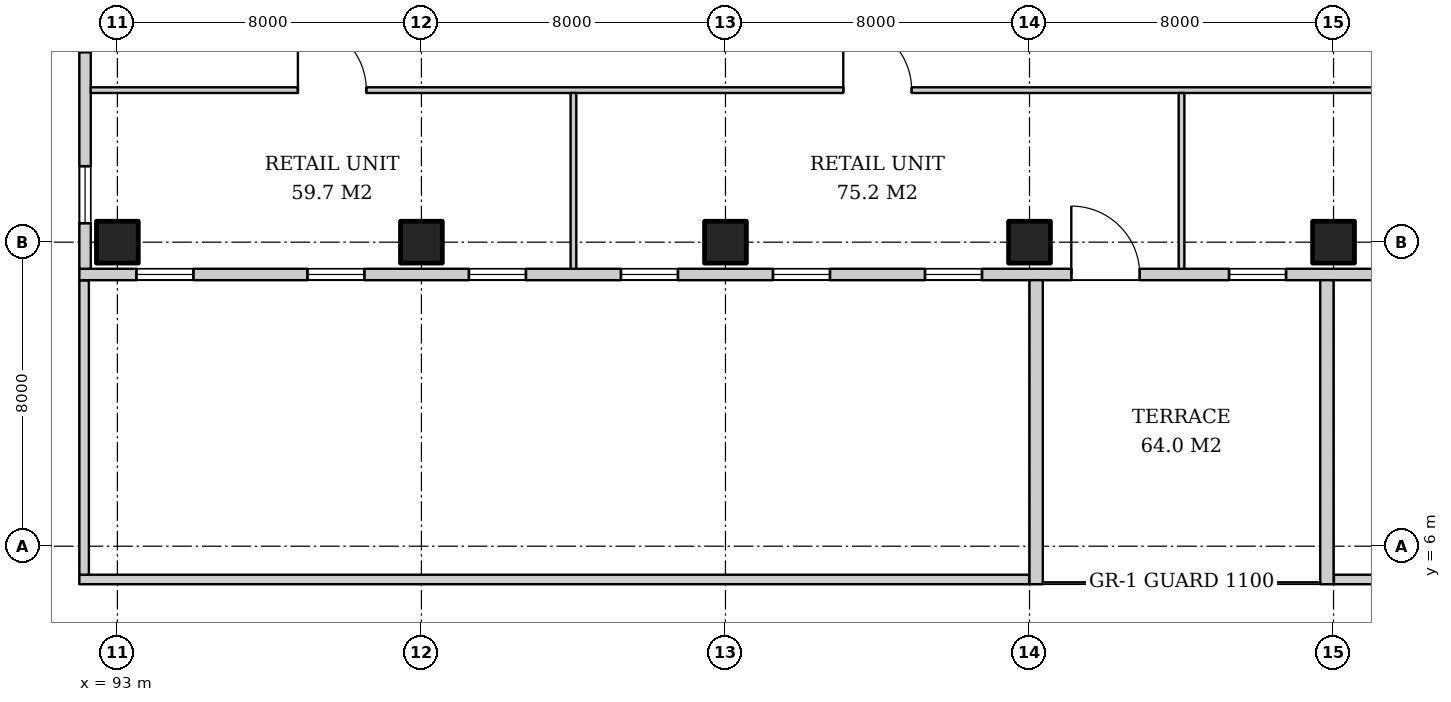
"""IFC4 building model, lengths in metres.
Left out: names, types, materials, properties, quantities, classifications, styles, units other than length and angle.
Written with IfcOpenShell. Run it as: python <this file> out.ifc"""

import sys

from ifc_helpers import new_model, si_unit, direction, frame, frame_2d, origin, origin_2d, place, context, subcontext, project, spatial, rectangle, extrude, element, fill, save


model = new_model("IFC4")
c1 = context("Model", 3, precision=1e-05, world=origin(), true_north=direction((0.0, 1.0)))
c2 = subcontext(c1, "Body", "Model", "MODEL_VIEW")
j1 = project(units=[si_unit("LENGTHUNIT", "METRE"), si_unit("PLANEANGLEUNIT", "RADIAN")], contexts=[c1])
p1 = place(None, origin())
s1 = spatial("IfcSite", under=j1, at=p1, CompositionType="ELEMENT")
p2 = place(p1, origin())
s2 = spatial("IfcBuilding", under=s1, at=p2, CompositionType="ELEMENT")
p3 = place(p2, frame((0.0, 0.0, 6.0)))
s3 = spatial("IfcBuildingStorey", under=s2, at=p3, CompositionType="ELEMENT", Elevation=6.0)
for number, where, z_axis, x_axis in (
    (1, (93.0, 14.0, 0.0), (0.0, 0.0, 1.0), (1.0, 0.0, 0.0)),
    (2, (101.0, 14.0, 0.0), (0.0, 0.0, 1.0), (1.0, 0.0, 0.0)),
    (3, (109.0, 14.0, 0.0), (0.0, 0.0, 1.0), (1.0, 0.0, 0.0)),
    (4, (117.0, 14.0, 0.0), (0.0, 0.0, 1.0), (1.0, 0.0, 0.0)),
    (5, (125.0, 14.0, 0.0), (0.0, 0.0, 1.0), (1.0, 0.0, 0.0)),
):
    element("IfcColumn", number, at=place(p3, frame(where, z_axis=z_axis, x_axis=x_axis)), inside=s3, PredefinedType="COLUMN", context=c2, shape_type="SweptSolid", body=[
        extrude(rectangle(XDim=1.1, YDim=1.1, at=origin_2d()), origin(), (0.0, 0.0, 1.0), 5.0),
    ])
p4 = place(p3, frame((92.0, 13.15, 0.0), z_axis=(0.0, 0.0, 1.0), x_axis=(1.0, 0.0, 0.0)))
e6 = element("IfcWall", 6, at=p4, inside=s3, PredefinedType="SOLIDWALL", context=c2, shape_type="SweptSolid", body=[
    extrude(rectangle(XDim=50.0, YDim=0.3, at=frame_2d((25.0, 0.0))), origin(), (0.0, 0.0, 1.0), 4.7),
])
p5 = place(p4, frame((1.5, 0.0, 0.9)))
e7 = element("IfcOpeningElement", 7, at=p5, cuts=e6, PredefinedType="OPENING", context=c2, shape_type="SweptSolid", body=[
    extrude(rectangle(XDim=1.5, YDim=3.2, at=frame_2d((0.75, 1.6))), frame((0.0, 0.16, 0.0), z_axis=(0.0, -1.0, 0.0), x_axis=(1.0, 0.0, 0.0)), (0.0, 0.0, 1.0), 0.32),
])
p6 = place(p4, frame((6.0, 0.0, 0.9)))
e8 = element("IfcOpeningElement", 8, at=p6, cuts=e6, PredefinedType="OPENING", context=c2, shape_type="SweptSolid", body=[
    extrude(rectangle(XDim=1.5, YDim=3.2, at=frame_2d((0.75, 1.6))), frame((0.0, 0.16, 0.0), z_axis=(0.0, -1.0, 0.0), x_axis=(1.0, 0.0, 0.0)), (0.0, 0.0, 1.0), 0.32),
])
p7 = place(p4, frame((10.25, 0.0, 0.9)))
e9 = element("IfcOpeningElement", 9, at=p7, cuts=e6, PredefinedType="OPENING", context=c2, shape_type="SweptSolid", body=[
    extrude(rectangle(XDim=1.5, YDim=3.2, at=frame_2d((0.75, 1.6))), frame((0.0, 0.16, 0.0), z_axis=(0.0, -1.0, 0.0), x_axis=(1.0, 0.0, 0.0)), (0.0, 0.0, 1.0), 0.32),
])
p8 = place(p4, frame((14.25, 0.0, 0.9)))
e10 = element("IfcOpeningElement", 10, at=p8, cuts=e6, PredefinedType="OPENING", context=c2, shape_type="SweptSolid", body=[
    extrude(rectangle(XDim=1.5, YDim=3.2, at=frame_2d((0.75, 1.6))), frame((0.0, 0.16, 0.0), z_axis=(0.0, -1.0, 0.0), x_axis=(1.0, 0.0, 0.0)), (0.0, 0.0, 1.0), 0.32),
])
p9 = place(p4, frame((18.25, 0.0, 0.9)))
e11 = element("IfcOpeningElement", 11, at=p9, cuts=e6, PredefinedType="OPENING", context=c2, shape_type="SweptSolid", body=[
    extrude(rectangle(XDim=1.5, YDim=3.2, at=frame_2d((0.75, 1.6))), frame((0.0, 0.16, 0.0), z_axis=(0.0, -1.0, 0.0), x_axis=(1.0, 0.0, 0.0)), (0.0, 0.0, 1.0), 0.32),
])
p10 = place(p4, frame((22.25, 0.0, 0.9)))
e12 = element("IfcOpeningElement", 12, at=p10, cuts=e6, PredefinedType="OPENING", context=c2, shape_type="SweptSolid", body=[
    extrude(rectangle(XDim=1.5, YDim=3.2, at=frame_2d((0.75, 1.6))), frame((0.0, 0.16, 0.0), z_axis=(0.0, -1.0, 0.0), x_axis=(1.0, 0.0, 0.0)), (0.0, 0.0, 1.0), 0.32),
])
p11 = place(p4, frame((26.1, 0.0, 0.0)))
e13 = element("IfcOpeningElement", 13, at=p11, cuts=e6, PredefinedType="OPENING", context=c2, shape_type="SweptSolid", body=[
    extrude(rectangle(XDim=1.8, YDim=2.4, at=frame_2d((0.9, 1.2))), frame((0.0, 0.16, 0.0), z_axis=(0.0, -1.0, 0.0), x_axis=(1.0, 0.0, 0.0)), (0.0, 0.0, 1.0), 0.32),
])
p12 = place(p4, frame((30.25, 0.0, 0.9)))
e14 = element("IfcOpeningElement", 14, at=p12, cuts=e6, PredefinedType="OPENING", context=c2, shape_type="SweptSolid", body=[
    extrude(rectangle(XDim=1.5, YDim=3.2, at=frame_2d((0.75, 1.6))), frame((0.0, 0.16, 0.0), z_axis=(0.0, -1.0, 0.0), x_axis=(1.0, 0.0, 0.0)), (0.0, 0.0, 1.0), 0.32),
])
p13 = place(p4, frame((34.25, 0.0, 0.9)))
e15 = element("IfcOpeningElement", 15, at=p13, cuts=e6, PredefinedType="OPENING", context=c2, shape_type="SweptSolid", body=[
    extrude(rectangle(XDim=1.5, YDim=3.2, at=frame_2d((0.75, 1.6))), frame((0.0, 0.16, 0.0), z_axis=(0.0, -1.0, 0.0), x_axis=(1.0, 0.0, 0.0)), (0.0, 0.0, 1.0), 0.32),
])
p14 = place(p4, frame((38.25, 0.0, 0.9)))
e16 = element("IfcOpeningElement", 16, at=p14, cuts=e6, PredefinedType="OPENING", context=c2, shape_type="SweptSolid", body=[
    extrude(rectangle(XDim=1.5, YDim=3.2, at=frame_2d((0.75, 1.6))), frame((0.0, 0.16, 0.0), z_axis=(0.0, -1.0, 0.0), x_axis=(1.0, 0.0, 0.0)), (0.0, 0.0, 1.0), 0.32),
])
p15 = place(p4, frame((42.5, 0.0, 0.9)))
e17 = element("IfcOpeningElement", 17, at=p15, cuts=e6, PredefinedType="OPENING", context=c2, shape_type="SweptSolid", body=[
    extrude(rectangle(XDim=1.5, YDim=3.2, at=frame_2d((0.75, 1.6))), frame((0.0, 0.16, 0.0), z_axis=(0.0, -1.0, 0.0), x_axis=(1.0, 0.0, 0.0)), (0.0, 0.0, 1.0), 0.32),
])
p16 = place(p4, frame((47.0, 0.0, 0.9)))
e18 = element("IfcOpeningElement", 18, at=p16, cuts=e6, PredefinedType="OPENING", context=c2, shape_type="SweptSolid", body=[
    extrude(rectangle(XDim=1.5, YDim=3.2, at=frame_2d((0.75, 1.6))), frame((0.0, 0.16, 0.0), z_axis=(0.0, -1.0, 0.0), x_axis=(1.0, 0.0, 0.0)), (0.0, 0.0, 1.0), 0.32),
])
p17 = place(p3, frame((92.15, 41.5, 0.0), z_axis=(0.0, 0.0, 1.0), x_axis=(0.0, -1.0, 0.0)))
e19 = element("IfcWall", 19, at=p17, inside=s3, PredefinedType="SOLIDWALL", context=c2, shape_type="SweptSolid", body=[
    extrude(rectangle(XDim=28.2, YDim=0.3, at=frame_2d((14.1, 0.0))), origin(), (0.0, 0.0, 1.0), 4.7),
])
p18 = place(p17, frame((0.75, 0.0, 0.9)))
e20 = element("IfcOpeningElement", 20, at=p18, cuts=e19, PredefinedType="OPENING", context=c2, shape_type="SweptSolid", body=[
    extrude(rectangle(XDim=1.5, YDim=3.2, at=frame_2d((0.75, 1.6))), frame((0.0, 0.16, 0.0), z_axis=(0.0, -1.0, 0.0), x_axis=(1.0, 0.0, 0.0)), (0.0, 0.0, 1.0), 0.32),
])
p19 = place(p17, frame((4.75, 0.0, 0.9)))
e21 = element("IfcOpeningElement", 21, at=p19, cuts=e19, PredefinedType="OPENING", context=c2, shape_type="SweptSolid", body=[
    extrude(rectangle(XDim=1.5, YDim=3.2, at=frame_2d((0.75, 1.6))), frame((0.0, 0.16, 0.0), z_axis=(0.0, -1.0, 0.0), x_axis=(1.0, 0.0, 0.0)), (0.0, 0.0, 1.0), 0.32),
])
p20 = place(p17, frame((8.75, 0.0, 0.9)))
e22 = element("IfcOpeningElement", 22, at=p20, cuts=e19, PredefinedType="OPENING", context=c2, shape_type="SweptSolid", body=[
    extrude(rectangle(XDim=1.5, YDim=3.2, at=frame_2d((0.75, 1.6))), frame((0.0, 0.16, 0.0), z_axis=(0.0, -1.0, 0.0), x_axis=(1.0, 0.0, 0.0)), (0.0, 0.0, 1.0), 0.32),
])
p21 = place(p17, frame((12.75, 0.0, 0.9)))
e23 = element("IfcOpeningElement", 23, at=p21, cuts=e19, PredefinedType="OPENING", context=c2, shape_type="SweptSolid", body=[
    extrude(rectangle(XDim=1.5, YDim=3.2, at=frame_2d((0.75, 1.6))), frame((0.0, 0.16, 0.0), z_axis=(0.0, -1.0, 0.0), x_axis=(1.0, 0.0, 0.0)), (0.0, 0.0, 1.0), 0.32),
])
p22 = place(p17, frame((16.75, 0.0, 0.9)))
e24 = element("IfcOpeningElement", 24, at=p22, cuts=e19, PredefinedType="OPENING", context=c2, shape_type="SweptSolid", body=[
    extrude(rectangle(XDim=1.5, YDim=3.2, at=frame_2d((0.75, 1.6))), frame((0.0, 0.16, 0.0), z_axis=(0.0, -1.0, 0.0), x_axis=(1.0, 0.0, 0.0)), (0.0, 0.0, 1.0), 0.32),
])
p23 = place(p17, frame((21.0, 0.0, 0.9)))
e25 = element("IfcOpeningElement", 25, at=p23, cuts=e19, PredefinedType="OPENING", context=c2, shape_type="SweptSolid", body=[
    extrude(rectangle(XDim=1.5, YDim=3.2, at=frame_2d((0.75, 1.6))), frame((0.0, 0.16, 0.0), z_axis=(0.0, -1.0, 0.0), x_axis=(1.0, 0.0, 0.0)), (0.0, 0.0, 1.0), 0.32),
])
p24 = place(p17, frame((25.5, 0.0, 0.9)))
e26 = element("IfcOpeningElement", 26, at=p24, cuts=e19, PredefinedType="OPENING", context=c2, shape_type="SweptSolid", body=[
    extrude(rectangle(XDim=1.5, YDim=3.2, at=frame_2d((0.75, 1.6))), frame((0.0, 0.16, 0.0), z_axis=(0.0, -1.0, 0.0), x_axis=(1.0, 0.0, 0.0)), (0.0, 0.0, 1.0), 0.32),
])
p25 = place(p3, frame((92.0, 5.125, 0.0), z_axis=(0.0, 0.0, 1.0), x_axis=(1.0, 0.0, 0.0)))
e27 = element("IfcWall", 27, at=p25, inside=s3, PredefinedType="PARAPET", context=c2, shape_type="SweptSolid", body=[
    extrude(rectangle(XDim=24.99, YDim=0.25, at=frame_2d((12.495, 0.0))), origin(), (0.0, 0.0, 1.0), 1.1),
])
p26 = place(p3, frame((92.125, 5.25, 0.0), z_axis=(0.0, 0.0, 1.0), x_axis=(0.0, 1.0, 0.0)))
e28 = element("IfcWall", 28, at=p26, inside=s3, PredefinedType="PARAPET", context=c2, shape_type="SweptSolid", body=[
    extrude(rectangle(XDim=7.74, YDim=0.25, at=frame_2d((3.87, 0.0))), origin(), (0.0, 0.0, 1.0), 1.1),
])
p27 = place(p3, frame((125.01, 5.125, 0.0), z_axis=(0.0, 0.0, 1.0), x_axis=(1.0, 0.0, 0.0)))
e29 = element("IfcWall", 29, at=p27, inside=s3, PredefinedType="PARAPET", context=c2, shape_type="SweptSolid", body=[
    extrude(rectangle(XDim=16.99, YDim=0.25, at=frame_2d((8.495, 0.0))), origin(), (0.0, 0.0, 1.0), 1.1),
])
for number, where, z_axis, x_axis in (
    (30, (117.175, 5.0, 0.0), (0.0, 0.0, 1.0), (0.0, 1.0, 0.0)),
    (31, (124.825, 5.0, 0.0), (0.0, 0.0, 1.0), (0.0, 1.0, 0.0)),
):
    element("IfcWall", number, at=place(p3, frame(where, z_axis=z_axis, x_axis=x_axis)), inside=s3, PredefinedType="PARAPET", context=c2, shape_type="SweptSolid", body=[
        extrude(rectangle(XDim=8.0, YDim=0.35, at=frame_2d((4.0, 0.0))), origin(), (0.0, 0.0, 1.0), 1.1),
    ])
p28 = place(p3, frame((92.3, 18.0, 0.0), z_axis=(0.0, 0.0, 1.0), x_axis=(1.0, 0.0, 0.0)))
e32 = element("IfcWall", 32, at=p28, inside=s3, PredefinedType="PARTITIONING", context=c2, shape_type="SweptSolid", body=[
    extrude(rectangle(XDim=49.4, YDim=0.15, at=frame_2d((24.7, 0.0))), origin(), (0.0, 0.0, 1.0), 3.2),
])
p29 = place(p28, frame((5.45, 0.0, 0.0)))
e33 = element("IfcOpeningElement", 33, at=p29, cuts=e32, PredefinedType="OPENING", context=c2, shape_type="SweptSolid", body=[
    extrude(rectangle(XDim=1.8, YDim=2.4, at=frame_2d((0.9, 1.2))), frame((0.0, 0.085, 0.0), z_axis=(0.0, -1.0, 0.0), x_axis=(1.0, 0.0, 0.0)), (0.0, 0.0, 1.0), 0.17),
])
p30 = place(p28, frame((19.8, 0.0, 0.0)))
e34 = element("IfcOpeningElement", 34, at=p30, cuts=e32, PredefinedType="OPENING", context=c2, shape_type="SweptSolid", body=[
    extrude(rectangle(XDim=1.8, YDim=2.4, at=frame_2d((0.9, 1.2))), frame((0.0, 0.085, 0.0), z_axis=(0.0, -1.0, 0.0), x_axis=(1.0, 0.0, 0.0)), (0.0, 0.0, 1.0), 0.17),
])
p31 = place(p28, frame((38.15, 0.0, 0.0)))
e35 = element("IfcOpeningElement", 35, at=p31, cuts=e32, PredefinedType="OPENING", context=c2, shape_type="SweptSolid", body=[
    extrude(rectangle(XDim=1.8, YDim=2.4, at=frame_2d((0.9, 1.2))), frame((0.0, 0.085, 0.0), z_axis=(0.0, -1.0, 0.0), x_axis=(1.0, 0.0, 0.0)), (0.0, 0.0, 1.0), 0.17),
])
for number, where, z_axis, x_axis in (
    (36, (105.0, 17.925, 0.0), (0.0, 0.0, 1.0), (0.0, -1.0, 0.0)),
    (37, (121.0, 17.925, 0.0), (0.0, 0.0, 1.0), (0.0, -1.0, 0.0)),
):
    element("IfcWall", number, at=place(p3, frame(where, z_axis=z_axis, x_axis=x_axis)), inside=s3, PredefinedType="PARTITIONING", context=c2, shape_type="SweptSolid", body=[
        extrude(rectangle(XDim=4.625, YDim=0.15, at=frame_2d((2.312, 0.0))), origin(), (0.0, 0.0, 1.0), 3.2),
    ])
p32 = place(p5, origin())
e38 = element("IfcWindow", 38, at=p32, inside=s3, PartitioningType="SINGLE_PANEL", PredefinedType="WINDOW", context=c2, shape_type="SweptSolid", body=[
    extrude(rectangle(XDim=1.5, YDim=3.2, at=frame_2d((0.75, 1.6))), frame((0.0, 0.03, 0.0), z_axis=(0.0, -1.0, 0.0), x_axis=(1.0, 0.0, 0.0)), (0.0, 0.0, 1.0), 0.06),
])
fill(e7, e38)
p33 = place(p6, origin())
e39 = element("IfcWindow", 39, at=p33, inside=s3, PartitioningType="SINGLE_PANEL", PredefinedType="WINDOW", context=c2, shape_type="SweptSolid", body=[
    extrude(rectangle(XDim=1.5, YDim=3.2, at=frame_2d((0.75, 1.6))), frame((0.0, 0.03, 0.0), z_axis=(0.0, -1.0, 0.0), x_axis=(1.0, 0.0, 0.0)), (0.0, 0.0, 1.0), 0.06),
])
fill(e8, e39)
p34 = place(p7, origin())
e40 = element("IfcWindow", 40, at=p34, inside=s3, PartitioningType="SINGLE_PANEL", PredefinedType="WINDOW", context=c2, shape_type="SweptSolid", body=[
    extrude(rectangle(XDim=1.5, YDim=3.2, at=frame_2d((0.75, 1.6))), frame((0.0, 0.03, 0.0), z_axis=(0.0, -1.0, 0.0), x_axis=(1.0, 0.0, 0.0)), (0.0, 0.0, 1.0), 0.06),
])
fill(e9, e40)
p35 = place(p8, origin())
e41 = element("IfcWindow", 41, at=p35, inside=s3, PartitioningType="SINGLE_PANEL", PredefinedType="WINDOW", context=c2, shape_type="SweptSolid", body=[
    extrude(rectangle(XDim=1.5, YDim=3.2, at=frame_2d((0.75, 1.6))), frame((0.0, 0.03, 0.0), z_axis=(0.0, -1.0, 0.0), x_axis=(1.0, 0.0, 0.0)), (0.0, 0.0, 1.0), 0.06),
])
fill(e10, e41)
p36 = place(p9, origin())
e42 = element("IfcWindow", 42, at=p36, inside=s3, PartitioningType="SINGLE_PANEL", PredefinedType="WINDOW", context=c2, shape_type="SweptSolid", body=[
    extrude(rectangle(XDim=1.5, YDim=3.2, at=frame_2d((0.75, 1.6))), frame((0.0, 0.03, 0.0), z_axis=(0.0, -1.0, 0.0), x_axis=(1.0, 0.0, 0.0)), (0.0, 0.0, 1.0), 0.06),
])
fill(e11, e42)
p37 = place(p10, origin())
e43 = element("IfcWindow", 43, at=p37, inside=s3, PartitioningType="SINGLE_PANEL", PredefinedType="WINDOW", context=c2, shape_type="SweptSolid", body=[
    extrude(rectangle(XDim=1.5, YDim=3.2, at=frame_2d((0.75, 1.6))), frame((0.0, 0.03, 0.0), z_axis=(0.0, -1.0, 0.0), x_axis=(1.0, 0.0, 0.0)), (0.0, 0.0, 1.0), 0.06),
])
fill(e12, e43)
p38 = place(p11, origin())
e44 = element("IfcDoor", 44, at=p38, inside=s3, OperationType="DOUBLE_DOOR_SINGLE_SWING", PredefinedType="DOOR", context=c2, shape_type="SweptSolid", body=[
    extrude(rectangle(XDim=1.8, YDim=2.4, at=frame_2d((0.9, 1.2))), frame((0.0, 0.025, 0.0), z_axis=(0.0, -1.0, 0.0), x_axis=(1.0, 0.0, 0.0)), (0.0, 0.0, 1.0), 0.05),
])
fill(e13, e44)
p39 = place(p12, origin())
e45 = element("IfcWindow", 45, at=p39, inside=s3, PartitioningType="SINGLE_PANEL", PredefinedType="WINDOW", context=c2, shape_type="SweptSolid", body=[
    extrude(rectangle(XDim=1.5, YDim=3.2, at=frame_2d((0.75, 1.6))), frame((0.0, 0.03, 0.0), z_axis=(0.0, -1.0, 0.0), x_axis=(1.0, 0.0, 0.0)), (0.0, 0.0, 1.0), 0.06),
])
fill(e14, e45)
p40 = place(p24, origin())
e46 = element("IfcWindow", 46, at=p40, inside=s3, PartitioningType="SINGLE_PANEL", PredefinedType="WINDOW", context=c2, shape_type="SweptSolid", body=[
    extrude(rectangle(XDim=1.5, YDim=3.2, at=frame_2d((0.75, 1.6))), frame((0.0, 0.03, 0.0), z_axis=(0.0, -1.0, 0.0), x_axis=(1.0, 0.0, 0.0)), (0.0, 0.0, 1.0), 0.06),
])
fill(e26, e46)
p41 = place(p29, origin())
e47 = element("IfcDoor", 47, at=p41, inside=s3, OperationType="DOUBLE_DOOR_SINGLE_SWING", PredefinedType="DOOR", context=c2, shape_type="SweptSolid", body=[
    extrude(rectangle(XDim=1.8, YDim=2.4, at=frame_2d((0.9, 1.2))), frame((0.0, 0.025, 0.0), z_axis=(0.0, -1.0, 0.0), x_axis=(1.0, 0.0, 0.0)), (0.0, 0.0, 1.0), 0.05),
])
fill(e33, e47)
p42 = place(p30, origin())
e48 = element("IfcDoor", 48, at=p42, inside=s3, OperationType="DOUBLE_DOOR_SINGLE_SWING", PredefinedType="DOOR", context=c2, shape_type="SweptSolid", body=[
    extrude(rectangle(XDim=1.8, YDim=2.4, at=frame_2d((0.9, 1.2))), frame((0.0, 0.025, 0.0), z_axis=(0.0, -1.0, 0.0), x_axis=(1.0, 0.0, 0.0)), (0.0, 0.0, 1.0), 0.05),
])
fill(e34, e48)
save(model, sys.argv[1])
